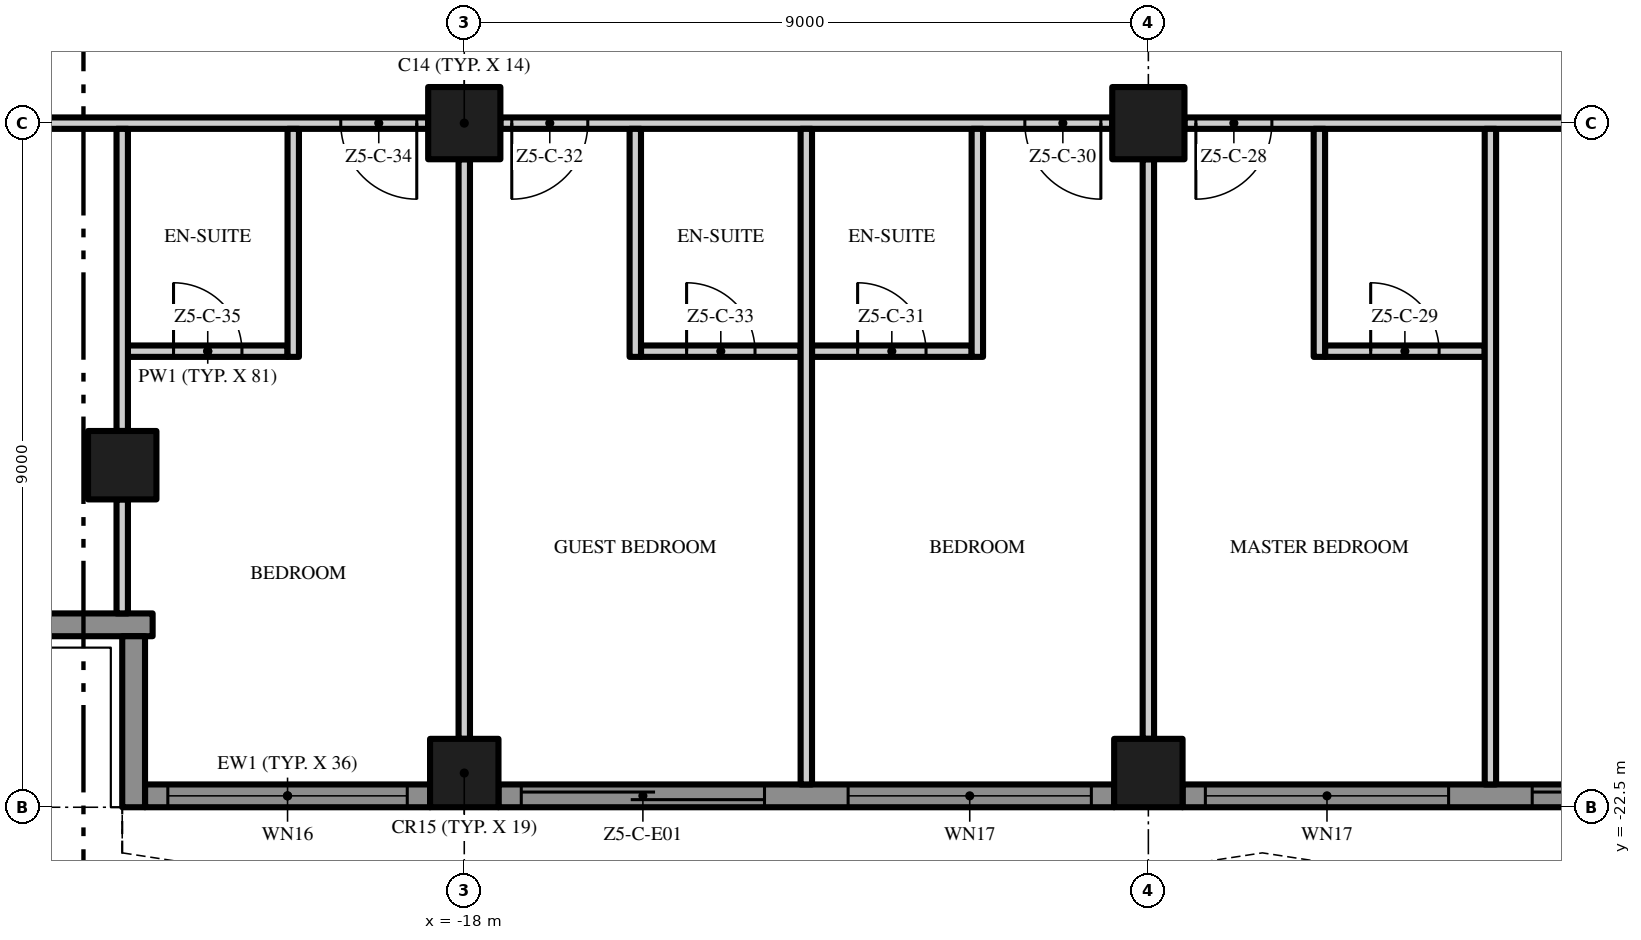
"""IFC4 building model, lengths in metres.
Left out: names, types, materials, properties, quantities, classifications, styles, units other than length and angle.
Written with IfcOpenShell. Run it as: python <this file> out.ifc"""

import sys

from ifc_helpers import new_model, si_unit, direction, frame, frame_2d, origin, origin_2d, place, context, subcontext, project, spatial, polyline, rectangle, outline, extrude, element, fill, save


model = new_model("IFC4")
c1 = context("Model", 3, precision=1e-05, world=origin(), true_north=direction((0.0, 1.0)))
c2 = subcontext(c1, "Body", "Model", "MODEL_VIEW")
j1 = project(units=[si_unit("LENGTHUNIT", "METRE"), si_unit("PLANEANGLEUNIT", "RADIAN")], contexts=[c1])
p1 = place(None, origin())
s1 = spatial("IfcSite", under=j1, at=p1, CompositionType="ELEMENT")
p2 = place(p1, origin())
s2 = spatial("IfcBuilding", under=s1, at=p2, CompositionType="ELEMENT")
p3 = place(p2, frame((0.0, 0.0, 265.4)))
s3 = spatial("IfcBuildingStorey", under=s2, at=p3, CompositionType="ELEMENT", Elevation=265.4)
p4 = place(p3, frame((-18.0, -13.5, 0.0), z_axis=(0.0, 0.0, 1.0), x_axis=(1.0, 0.0, 0.0)))
e1 = element("IfcColumn", 1, at=p4, inside=s3, PredefinedType="COLUMN", context=c2, shape_type="SweptSolid", body=[
    extrude(rectangle(XDim=0.95, YDim=0.95, at=origin_2d()), origin(), (0.0, 0.0, 1.0), 3.5),
])
for number, where, z_axis, x_axis in (
    (2, (-18.0, -22.05, 0.0), (0.0, 0.0, 1.0), (1.0, 0.0, 0.0)),
    (3, (-22.5, -18.0, 0.0), (0.0, 0.0, 1.0), (1.0, 0.0, 0.0)),
):
    element("IfcColumn", number, at=place(p3, frame(where, z_axis=z_axis, x_axis=x_axis)), inside=s3, PredefinedType="COLUMN", context=c2, shape_type="SweptSolid", body=[
        extrude(rectangle(XDim=0.9, YDim=0.9, at=origin_2d()), origin(), (0.0, 0.0, 1.0), 3.5),
    ])
p5 = place(p3, frame((-9.0, -13.5, 0.0), z_axis=(0.0, 0.0, 1.0), x_axis=(1.0, 0.0, 0.0)))
e4 = element("IfcColumn", 4, at=p5, inside=s3, PredefinedType="COLUMN", context=c2, shape_type="SweptSolid", body=[
    extrude(rectangle(XDim=0.95, YDim=0.95, at=origin_2d()), origin(), (0.0, 0.0, 1.0), 3.5),
])
p6 = place(p3, frame((-9.0, -22.05, 0.0), z_axis=(0.0, 0.0, 1.0), x_axis=(1.0, 0.0, 0.0)))
e5 = element("IfcColumn", 5, at=p6, inside=s3, PredefinedType="COLUMN", context=c2, shape_type="SweptSolid", body=[
    extrude(rectangle(XDim=0.9, YDim=0.9, at=origin_2d()), origin(), (0.0, 0.0, 1.0), 3.5),
])
p7 = place(p3, frame((-18.45, -22.35, 0.0), z_axis=(0.0, 0.0, 1.0), x_axis=(-1.0, 0.0, 0.0)))
e6 = element("IfcWall", 6, at=p7, inside=s3, PredefinedType="SOLIDWALL", context=c2, shape_type="SweptSolid", body=[
    extrude(rectangle(XDim=3.75, YDim=0.3, at=frame_2d((1.875, 0.0))), origin(), (0.0, 0.0, 1.0), 3.5),
])
p8 = place(p7, frame((0.3, 0.0, 0.45)))
e7 = element("IfcOpeningElement", 7, at=p8, cuts=e6, PredefinedType="OPENING", context=c2, shape_type="SweptSolid", body=[
    extrude(rectangle(XDim=3.15, YDim=2.65, at=frame_2d((1.575, 1.325))), frame((0.0, 0.16, 0.0), z_axis=(0.0, -1.0, 0.0), x_axis=(1.0, 0.0, 0.0)), (0.0, 0.0, 1.0), 0.32),
])
p9 = place(p3, frame((-9.45, -22.35, 0.0), z_axis=(0.0, 0.0, 1.0), x_axis=(-1.0, 0.0, 0.0)))
e8 = element("IfcWall", 8, at=p9, inside=s3, PredefinedType="SOLIDWALL", context=c2, shape_type="SweptSolid", body=[
    extrude(rectangle(XDim=8.1, YDim=0.3, at=frame_2d((4.05, 0.0))), origin(), (0.0, 0.0, 1.0), 3.5),
])
p10 = place(p9, frame((4.6, 0.0, 0.0)))
e9 = element("IfcOpeningElement", 9, at=p10, cuts=e8, PredefinedType="OPENING", context=c2, shape_type="SweptSolid", body=[
    extrude(rectangle(XDim=3.2, YDim=2.4, at=frame_2d((1.6, 1.2))), frame((0.0, 0.16, 0.0), z_axis=(0.0, -1.0, 0.0), x_axis=(1.0, 0.0, 0.0)), (0.0, 0.0, 1.0), 0.32),
])
p11 = place(p9, frame((0.3, 0.0, 0.45)))
e10 = element("IfcOpeningElement", 10, at=p11, cuts=e8, PredefinedType="OPENING", context=c2, shape_type="SweptSolid", body=[
    extrude(rectangle(XDim=3.2, YDim=2.65, at=frame_2d((1.6, 1.325))), frame((0.0, 0.16, 0.0), z_axis=(0.0, -1.0, 0.0), x_axis=(1.0, 0.0, 0.0)), (0.0, 0.0, 1.0), 0.32),
])
p12 = place(p3, frame((-0.45, -22.35, 0.0), z_axis=(0.0, 0.0, 1.0), x_axis=(-1.0, 0.0, 0.0)))
e11 = element("IfcWall", 11, at=p12, inside=s3, PredefinedType="SOLIDWALL", context=c2, shape_type="SweptSolid", body=[
    extrude(rectangle(XDim=8.1, YDim=0.3, at=frame_2d((4.05, 0.0))), origin(), (0.0, 0.0, 1.0), 3.5),
])
p13 = place(p12, frame((4.6, 0.0, 0.45)))
e12 = element("IfcOpeningElement", 12, at=p13, cuts=e11, PredefinedType="OPENING", context=c2, shape_type="SweptSolid", body=[
    extrude(rectangle(XDim=3.2, YDim=2.65, at=frame_2d((1.6, 1.325))), frame((0.0, 0.16, 0.0), z_axis=(0.0, -1.0, 0.0), x_axis=(1.0, 0.0, 0.0)), (0.0, 0.0, 1.0), 0.32),
])
p14 = place(p12, frame((0.3, 0.0, 0.0)))
e13 = element("IfcOpeningElement", 13, at=p14, cuts=e11, PredefinedType="OPENING", context=c2, shape_type="SweptSolid", body=[
    extrude(rectangle(XDim=3.2, YDim=2.4, at=frame_2d((1.6, 1.2))), frame((0.0, 0.16, 0.0), z_axis=(0.0, -1.0, 0.0), x_axis=(1.0, 0.0, 0.0)), (0.0, 0.0, 1.0), 0.32),
])
p15 = place(p3, frame((-22.1, -20.1, 0.0), z_axis=(0.0, 0.0, 1.0), x_axis=(-1.0, 0.0, 0.0)))
e14 = element("IfcWall", 14, at=p15, inside=s3, PredefinedType="SOLIDWALL", context=c2, shape_type="SweptSolid", body=[
    extrude(rectangle(XDim=2.35, YDim=0.3, at=frame_2d((1.175, 0.0))), origin(), (0.0, 0.0, 1.0), 3.5),
])
p16 = place(p3, frame((-22.35, -22.5, 0.0), z_axis=(0.0, 0.0, 1.0), x_axis=(0.0, 1.0, 0.0)))
e15 = element("IfcWall", 15, at=p16, inside=s3, PredefinedType="SOLIDWALL", context=c2, shape_type="SweptSolid", body=[
    extrude(rectangle(XDim=2.25, YDim=0.3, at=frame_2d((1.125, 0.0))), origin(), (0.0, 0.0, 1.0), 3.5),
])
p17 = place(p3, origin())
e16 = element("IfcWall", 16, at=p17, inside=s3, PredefinedType="USERDEFINED", context=c2, shape_type="SweptSolid", body=[
    extrude(outline(polyline([(-22.5, -23.1), (-21.0, -23.329), (-19.5, -23.929), (-18.0, -24.671), (-16.5, -25.271), (-15.0, -25.5), (-13.5, -25.271), (-12.0, -24.671), (-10.5, -23.929), (-9.0, -23.329), (-7.5, -23.1), (-6.0, -23.329), (-4.5, -23.929), (-3.0, -24.671), (-1.5, -25.271), (0.0, -25.5), (1.5, -25.271), (3.0, -24.671), (4.5, -23.929), (6.0, -23.329), (7.5, -23.1), (9.0, -23.329), (10.5, -23.929), (12.0, -24.671), (13.5, -25.271), (15.0, -25.5), (16.5, -25.271), (18.0, -24.671), (19.5, -23.929), (21.0, -23.329), (22.5, -23.1), (22.462, -22.853), (20.934, -23.086), (19.398, -23.701), (17.898, -24.442), (16.434, -25.028), (15.0, -25.247), (13.566, -25.028), (12.102, -24.442), (10.602, -23.701), (9.066, -23.086), (7.5, -22.847), (5.934, -23.086), (4.398, -23.701), (2.898, -24.442), (1.434, -25.028), (0.0, -25.247), (-1.434, -25.028), (-2.898, -24.442), (-4.398, -23.701), (-5.934, -23.086), (-7.5, -22.847), (-9.066, -23.086), (-10.602, -23.701), (-12.102, -24.442), (-13.566, -25.028), (-15.0, -25.247), (-16.434, -25.028), (-17.898, -24.442), (-19.398, -23.701), (-20.934, -23.086), (-22.462, -22.853), (-22.5, -23.1)])), origin(), (0.0, 0.0, 1.0), 0.9),
])
p18 = place(p3, frame((-22.425, -16.5, 0.0), z_axis=(0.0, 0.0, 1.0), x_axis=(1.0, 0.0, 0.0)))
e17 = element("IfcWall", 17, at=p18, inside=s3, PredefinedType="PARTITIONING", context=c2, shape_type="SweptSolid", body=[
    extrude(rectangle(XDim=2.1, YDim=0.15, at=frame_2d((1.05, 0.0))), origin(), (0.0, 0.0, 1.0), 3.5),
])
p19 = place(p18, frame((0.6, 0.0, 0.0)))
e18 = element("IfcOpeningElement", 18, at=p19, cuts=e17, PredefinedType="OPENING", context=c2, shape_type="SweptSolid", body=[
    extrude(rectangle(XDim=0.9, YDim=2.1, at=frame_2d((0.45, 1.05))), frame((0.0, 0.085, 0.0), z_axis=(0.0, -1.0, 0.0), x_axis=(1.0, 0.0, 0.0)), (0.0, 0.0, 1.0), 0.17),
])
p20 = place(p3, frame((-15.675, -16.5, 0.0), z_axis=(0.0, 0.0, 1.0), x_axis=(1.0, 0.0, 0.0)))
e19 = element("IfcWall", 19, at=p20, inside=s3, PredefinedType="PARTITIONING", context=c2, shape_type="SweptSolid", body=[
    extrude(rectangle(XDim=2.1, YDim=0.15, at=frame_2d((1.05, 0.0))), origin(), (0.0, 0.0, 1.0), 3.5),
])
p21 = place(p20, frame((0.6, 0.0, 0.0)))
e20 = element("IfcOpeningElement", 20, at=p21, cuts=e19, PredefinedType="OPENING", context=c2, shape_type="SweptSolid", body=[
    extrude(rectangle(XDim=0.9, YDim=2.1, at=frame_2d((0.45, 1.05))), frame((0.0, 0.085, 0.0), z_axis=(0.0, -1.0, 0.0), x_axis=(1.0, 0.0, 0.0)), (0.0, 0.0, 1.0), 0.17),
])
p22 = place(p3, frame((-13.425, -16.5, 0.0), z_axis=(0.0, 0.0, 1.0), x_axis=(1.0, 0.0, 0.0)))
e21 = element("IfcWall", 21, at=p22, inside=s3, PredefinedType="PARTITIONING", context=c2, shape_type="SweptSolid", body=[
    extrude(rectangle(XDim=2.1, YDim=0.15, at=frame_2d((1.05, 0.0))), origin(), (0.0, 0.0, 1.0), 3.5),
])
p23 = place(p22, frame((0.6, 0.0, 0.0)))
e22 = element("IfcOpeningElement", 22, at=p23, cuts=e21, PredefinedType="OPENING", context=c2, shape_type="SweptSolid", body=[
    extrude(rectangle(XDim=0.9, YDim=2.1, at=frame_2d((0.45, 1.05))), frame((0.0, 0.085, 0.0), z_axis=(0.0, -1.0, 0.0), x_axis=(1.0, 0.0, 0.0)), (0.0, 0.0, 1.0), 0.17),
])
p24 = place(p3, frame((-6.675, -16.5, 0.0), z_axis=(0.0, 0.0, 1.0), x_axis=(1.0, 0.0, 0.0)))
e23 = element("IfcWall", 23, at=p24, inside=s3, PredefinedType="PARTITIONING", context=c2, shape_type="SweptSolid", body=[
    extrude(rectangle(XDim=2.1, YDim=0.15, at=frame_2d((1.05, 0.0))), origin(), (0.0, 0.0, 1.0), 3.5),
])
p25 = place(p24, frame((0.6, 0.0, 0.0)))
e24 = element("IfcOpeningElement", 24, at=p25, cuts=e23, PredefinedType="OPENING", context=c2, shape_type="SweptSolid", body=[
    extrude(rectangle(XDim=0.9, YDim=2.1, at=frame_2d((0.45, 1.05))), frame((0.0, 0.085, 0.0), z_axis=(0.0, -1.0, 0.0), x_axis=(1.0, 0.0, 0.0)), (0.0, 0.0, 1.0), 0.17),
])
p26 = place(p3, frame((-18.475, -13.5, 0.0), z_axis=(0.0, 0.0, 1.0), x_axis=(-1.0, 0.0, 0.0)))
e25 = element("IfcWall", 25, at=p26, inside=s3, PredefinedType="PARTITIONING", context=c2, shape_type="SweptSolid", body=[
    extrude(rectangle(XDim=7.625, YDim=0.15, at=frame_2d((3.812, 0.0))), origin(), (0.0, 0.0, 1.0), 3.5),
])
p27 = place(p26, frame((0.15, 0.0, 0.0)))
e26 = element("IfcOpeningElement", 26, at=p27, cuts=e25, PredefinedType="OPENING", context=c2, shape_type="SweptSolid", body=[
    extrude(rectangle(XDim=1.0, YDim=2.4, at=frame_2d((0.5, 1.2))), frame((0.0, 0.085, 0.0), z_axis=(0.0, -1.0, 0.0), x_axis=(1.0, 0.0, 0.0)), (0.0, 0.0, 1.0), 0.17),
])
p28 = place(p26, frame((5.775, 0.0, 0.0)))
e27 = element("IfcOpeningElement", 27, at=p28, cuts=e25, PredefinedType="OPENING", context=c2, shape_type="SweptSolid", body=[
    extrude(rectangle(XDim=1.0, YDim=2.4, at=frame_2d((0.5, 1.2))), frame((0.0, 0.085, 0.0), z_axis=(0.0, -1.0, 0.0), x_axis=(1.0, 0.0, 0.0)), (0.0, 0.0, 1.0), 0.17),
])
p29 = place(p3, frame((-9.475, -13.5, 0.0), z_axis=(0.0, 0.0, 1.0), x_axis=(-1.0, 0.0, 0.0)))
e28 = element("IfcWall", 28, at=p29, inside=s3, PredefinedType="PARTITIONING", context=c2, shape_type="SweptSolid", body=[
    extrude(rectangle(XDim=8.05, YDim=0.15, at=frame_2d((4.025, 0.0))), origin(), (0.0, 0.0, 1.0), 3.5),
])
p30 = place(p29, frame((0.15, 0.0, 0.0)))
e29 = element("IfcOpeningElement", 29, at=p30, cuts=e28, PredefinedType="OPENING", context=c2, shape_type="SweptSolid", body=[
    extrude(rectangle(XDim=1.0, YDim=2.4, at=frame_2d((0.5, 1.2))), frame((0.0, 0.085, 0.0), z_axis=(0.0, -1.0, 0.0), x_axis=(1.0, 0.0, 0.0)), (0.0, 0.0, 1.0), 0.17),
])
p31 = place(p29, frame((6.9, 0.0, 0.0)))
e30 = element("IfcOpeningElement", 30, at=p31, cuts=e28, PredefinedType="OPENING", context=c2, shape_type="SweptSolid", body=[
    extrude(rectangle(XDim=1.0, YDim=2.4, at=frame_2d((0.5, 1.2))), frame((0.0, 0.085, 0.0), z_axis=(0.0, -1.0, 0.0), x_axis=(1.0, 0.0, 0.0)), (0.0, 0.0, 1.0), 0.17),
])
p32 = place(p3, frame((-0.475, -13.5, 0.0), z_axis=(0.0, 0.0, 1.0), x_axis=(-1.0, 0.0, 0.0)))
e31 = element("IfcWall", 31, at=p32, inside=s3, PredefinedType="PARTITIONING", context=c2, shape_type="SweptSolid", body=[
    extrude(rectangle(XDim=8.05, YDim=0.15, at=frame_2d((4.025, 0.0))), origin(), (0.0, 0.0, 1.0), 3.5),
])
p33 = place(p32, frame((0.15, 0.0, 0.0)))
e32 = element("IfcOpeningElement", 32, at=p33, cuts=e31, PredefinedType="OPENING", context=c2, shape_type="SweptSolid", body=[
    extrude(rectangle(XDim=1.8, YDim=2.4, at=frame_2d((0.9, 1.2))), frame((0.0, 0.085, 0.0), z_axis=(0.0, -1.0, 0.0), x_axis=(1.0, 0.0, 0.0)), (0.0, 0.0, 1.0), 0.17),
])
p34 = place(p32, frame((6.9, 0.0, 0.0)))
e33 = element("IfcOpeningElement", 33, at=p34, cuts=e31, PredefinedType="OPENING", context=c2, shape_type="SweptSolid", body=[
    extrude(rectangle(XDim=1.0, YDim=2.4, at=frame_2d((0.5, 1.2))), frame((0.0, 0.085, 0.0), z_axis=(0.0, -1.0, 0.0), x_axis=(1.0, 0.0, 0.0)), (0.0, 0.0, 1.0), 0.17),
])
p35 = place(p3, frame((-22.5, -19.95, 0.0), z_axis=(0.0, 0.0, 1.0), x_axis=(0.0, 1.0, 0.0)))
e34 = element("IfcWall", 34, at=p35, inside=s3, PredefinedType="PARTITIONING", context=c2, shape_type="SweptSolid", body=[
    extrude(rectangle(XDim=1.5, YDim=0.15, at=frame_2d((0.75, 0.0))), origin(), (0.0, 0.0, 1.0), 3.5),
])
p36 = place(p3, frame((-22.5, -17.55, 0.0), z_axis=(0.0, 0.0, 1.0), x_axis=(0.0, 1.0, 0.0)))
e35 = element("IfcWall", 35, at=p36, inside=s3, PredefinedType="PARTITIONING", context=c2, shape_type="SweptSolid", body=[
    extrude(rectangle(XDim=3.975, YDim=0.15, at=frame_2d((1.988, 0.0))), origin(), (0.0, 0.0, 1.0), 3.5),
])
p37 = place(p3, frame((-20.25, -16.575, 0.0), z_axis=(0.0, 0.0, 1.0), x_axis=(0.0, 1.0, 0.0)))
e36 = element("IfcWall", 36, at=p37, inside=s3, PredefinedType="PARTITIONING", context=c2, shape_type="SweptSolid", body=[
    extrude(rectangle(XDim=3.0, YDim=0.15, at=frame_2d((1.5, 0.0))), origin(), (0.0, 0.0, 1.0), 3.5),
])
p38 = place(p3, frame((-18.0, -21.6, 0.0), z_axis=(0.0, 0.0, 1.0), x_axis=(0.0, 1.0, 0.0)))
e37 = element("IfcWall", 37, at=p38, inside=s3, PredefinedType="PARTITIONING", context=c2, shape_type="SweptSolid", body=[
    extrude(rectangle(XDim=7.625, YDim=0.15, at=frame_2d((3.812, 0.0))), origin(), (0.0, 0.0, 1.0), 3.5),
])
p39 = place(p3, frame((-15.75, -16.575, 0.0), z_axis=(0.0, 0.0, 1.0), x_axis=(0.0, 1.0, 0.0)))
e38 = element("IfcWall", 38, at=p39, inside=s3, PredefinedType="PARTITIONING", context=c2, shape_type="SweptSolid", body=[
    extrude(rectangle(XDim=3.0, YDim=0.15, at=frame_2d((1.5, 0.0))), origin(), (0.0, 0.0, 1.0), 3.5),
])
p40 = place(p3, frame((-13.5, -22.2, 0.0), z_axis=(0.0, 0.0, 1.0), x_axis=(0.0, 1.0, 0.0)))
e39 = element("IfcWall", 39, at=p40, inside=s3, PredefinedType="PARTITIONING", context=c2, shape_type="SweptSolid", body=[
    extrude(rectangle(XDim=8.625, YDim=0.15, at=frame_2d((4.312, 0.0))), origin(), (0.0, 0.0, 1.0), 3.5),
])
p41 = place(p3, frame((-11.25, -16.575, 0.0), z_axis=(0.0, 0.0, 1.0), x_axis=(0.0, 1.0, 0.0)))
e40 = element("IfcWall", 40, at=p41, inside=s3, PredefinedType="PARTITIONING", context=c2, shape_type="SweptSolid", body=[
    extrude(rectangle(XDim=3.0, YDim=0.15, at=frame_2d((1.5, 0.0))), origin(), (0.0, 0.0, 1.0), 3.5),
])
p42 = place(p3, frame((-9.0, -21.6, 0.0), z_axis=(0.0, 0.0, 1.0), x_axis=(0.0, 1.0, 0.0)))
e41 = element("IfcWall", 41, at=p42, inside=s3, PredefinedType="PARTITIONING", context=c2, shape_type="SweptSolid", body=[
    extrude(rectangle(XDim=7.625, YDim=0.15, at=frame_2d((3.812, 0.0))), origin(), (0.0, 0.0, 1.0), 3.5),
])
p43 = place(p3, frame((-6.75, -16.575, 0.0), z_axis=(0.0, 0.0, 1.0), x_axis=(0.0, 1.0, 0.0)))
e42 = element("IfcWall", 42, at=p43, inside=s3, PredefinedType="PARTITIONING", context=c2, shape_type="SweptSolid", body=[
    extrude(rectangle(XDim=3.0, YDim=0.15, at=frame_2d((1.5, 0.0))), origin(), (0.0, 0.0, 1.0), 3.5),
])
p44 = place(p3, frame((-4.5, -22.2, 0.0), z_axis=(0.0, 0.0, 1.0), x_axis=(0.0, 1.0, 0.0)))
e43 = element("IfcWall", 43, at=p44, inside=s3, PredefinedType="PARTITIONING", context=c2, shape_type="SweptSolid", body=[
    extrude(rectangle(XDim=8.625, YDim=0.15, at=frame_2d((4.312, 0.0))), origin(), (0.0, 0.0, 1.0), 3.5),
])
p45 = place(p8, origin())
e44 = element("IfcWindow", 44, at=p45, inside=s3, PartitioningType="SINGLE_PANEL", PredefinedType="WINDOW", context=c2, shape_type="SweptSolid", body=[
    extrude(rectangle(XDim=3.15, YDim=2.65, at=frame_2d((1.575, 1.325))), frame((0.0, 0.03, 0.0), z_axis=(0.0, -1.0, 0.0), x_axis=(1.0, 0.0, 0.0)), (0.0, 0.0, 1.0), 0.06),
])
fill(e7, e44)
p46 = place(p10, origin())
e45 = element("IfcDoor", 45, at=p46, inside=s3, OperationType="SINGLE_SWING_LEFT", PredefinedType="DOOR", context=c2, shape_type="SweptSolid", body=[
    extrude(rectangle(XDim=3.2, YDim=2.4, at=frame_2d((1.6, 1.2))), frame((0.0, 0.025, 0.0), z_axis=(0.0, -1.0, 0.0), x_axis=(1.0, 0.0, 0.0)), (0.0, 0.0, 1.0), 0.05),
])
fill(e9, e45)
p47 = place(p11, origin())
e46 = element("IfcWindow", 46, at=p47, inside=s3, PartitioningType="SINGLE_PANEL", PredefinedType="WINDOW", context=c2, shape_type="SweptSolid", body=[
    extrude(rectangle(XDim=3.2, YDim=2.65, at=frame_2d((1.6, 1.325))), frame((0.0, 0.03, 0.0), z_axis=(0.0, -1.0, 0.0), x_axis=(1.0, 0.0, 0.0)), (0.0, 0.0, 1.0), 0.06),
])
fill(e10, e46)
p48 = place(p13, origin())
e47 = element("IfcWindow", 47, at=p48, inside=s3, PartitioningType="SINGLE_PANEL", PredefinedType="WINDOW", context=c2, shape_type="SweptSolid", body=[
    extrude(rectangle(XDim=3.2, YDim=2.65, at=frame_2d((1.6, 1.325))), frame((0.0, 0.03, 0.0), z_axis=(0.0, -1.0, 0.0), x_axis=(1.0, 0.0, 0.0)), (0.0, 0.0, 1.0), 0.06),
])
fill(e12, e47)
p49 = place(p14, origin())
e48 = element("IfcDoor", 48, at=p49, inside=s3, OperationType="SINGLE_SWING_LEFT", PredefinedType="DOOR", context=c2, shape_type="SweptSolid", body=[
    extrude(rectangle(XDim=3.2, YDim=2.4, at=frame_2d((1.6, 1.2))), frame((0.0, 0.025, 0.0), z_axis=(0.0, -1.0, 0.0), x_axis=(1.0, 0.0, 0.0)), (0.0, 0.0, 1.0), 0.05),
])
fill(e13, e48)
p50 = place(p34, origin())
e49 = element("IfcDoor", 49, at=p50, inside=s3, OperationType="SINGLE_SWING_RIGHT", PredefinedType="DOOR", context=c2, shape_type="SweptSolid", body=[
    extrude(rectangle(XDim=1.0, YDim=2.4, at=frame_2d((0.5, 1.2))), frame((0.0, 0.025, 0.0), z_axis=(0.0, -1.0, 0.0), x_axis=(1.0, 0.0, 0.0)), (0.0, 0.0, 1.0), 0.05),
])
fill(e33, e49)
p51 = place(p25, origin())
e50 = element("IfcDoor", 50, at=p51, inside=s3, OperationType="SINGLE_SWING_LEFT", PredefinedType="DOOR", context=c2, shape_type="SweptSolid", body=[
    extrude(rectangle(XDim=0.9, YDim=2.1, at=frame_2d((0.45, 1.05))), frame((0.0, 0.025, 0.0), z_axis=(0.0, -1.0, 0.0), x_axis=(1.0, 0.0, 0.0)), (0.0, 0.0, 1.0), 0.05),
])
fill(e24, e50)
p52 = place(p30, origin())
e51 = element("IfcDoor", 51, at=p52, inside=s3, OperationType="SINGLE_SWING_LEFT", PredefinedType="DOOR", context=c2, shape_type="SweptSolid", body=[
    extrude(rectangle(XDim=1.0, YDim=2.4, at=frame_2d((0.5, 1.2))), frame((0.0, 0.025, 0.0), z_axis=(0.0, -1.0, 0.0), x_axis=(1.0, 0.0, 0.0)), (0.0, 0.0, 1.0), 0.05),
])
fill(e29, e51)
p53 = place(p23, origin())
e52 = element("IfcDoor", 52, at=p53, inside=s3, OperationType="SINGLE_SWING_LEFT", PredefinedType="DOOR", context=c2, shape_type="SweptSolid", body=[
    extrude(rectangle(XDim=0.9, YDim=2.1, at=frame_2d((0.45, 1.05))), frame((0.0, 0.025, 0.0), z_axis=(0.0, -1.0, 0.0), x_axis=(1.0, 0.0, 0.0)), (0.0, 0.0, 1.0), 0.05),
])
fill(e22, e52)
p54 = place(p31, origin())
e53 = element("IfcDoor", 53, at=p54, inside=s3, OperationType="SINGLE_SWING_RIGHT", PredefinedType="DOOR", context=c2, shape_type="SweptSolid", body=[
    extrude(rectangle(XDim=1.0, YDim=2.4, at=frame_2d((0.5, 1.2))), frame((0.0, 0.025, 0.0), z_axis=(0.0, -1.0, 0.0), x_axis=(1.0, 0.0, 0.0)), (0.0, 0.0, 1.0), 0.05),
])
fill(e30, e53)
p55 = place(p21, origin())
e54 = element("IfcDoor", 54, at=p55, inside=s3, OperationType="SINGLE_SWING_LEFT", PredefinedType="DOOR", context=c2, shape_type="SweptSolid", body=[
    extrude(rectangle(XDim=0.9, YDim=2.1, at=frame_2d((0.45, 1.05))), frame((0.0, 0.025, 0.0), z_axis=(0.0, -1.0, 0.0), x_axis=(1.0, 0.0, 0.0)), (0.0, 0.0, 1.0), 0.05),
])
fill(e20, e54)
p56 = place(p27, origin())
e55 = element("IfcDoor", 55, at=p56, inside=s3, OperationType="SINGLE_SWING_LEFT", PredefinedType="DOOR", context=c2, shape_type="SweptSolid", body=[
    extrude(rectangle(XDim=1.0, YDim=2.4, at=frame_2d((0.5, 1.2))), frame((0.0, 0.025, 0.0), z_axis=(0.0, -1.0, 0.0), x_axis=(1.0, 0.0, 0.0)), (0.0, 0.0, 1.0), 0.05),
])
fill(e26, e55)
p57 = place(p19, origin())
e56 = element("IfcDoor", 56, at=p57, inside=s3, OperationType="SINGLE_SWING_LEFT", PredefinedType="DOOR", context=c2, shape_type="SweptSolid", body=[
    extrude(rectangle(XDim=0.9, YDim=2.1, at=frame_2d((0.45, 1.05))), frame((0.0, 0.025, 0.0), z_axis=(0.0, -1.0, 0.0), x_axis=(1.0, 0.0, 0.0)), (0.0, 0.0, 1.0), 0.05),
])
fill(e18, e56)
save(model, sys.argv[1])
